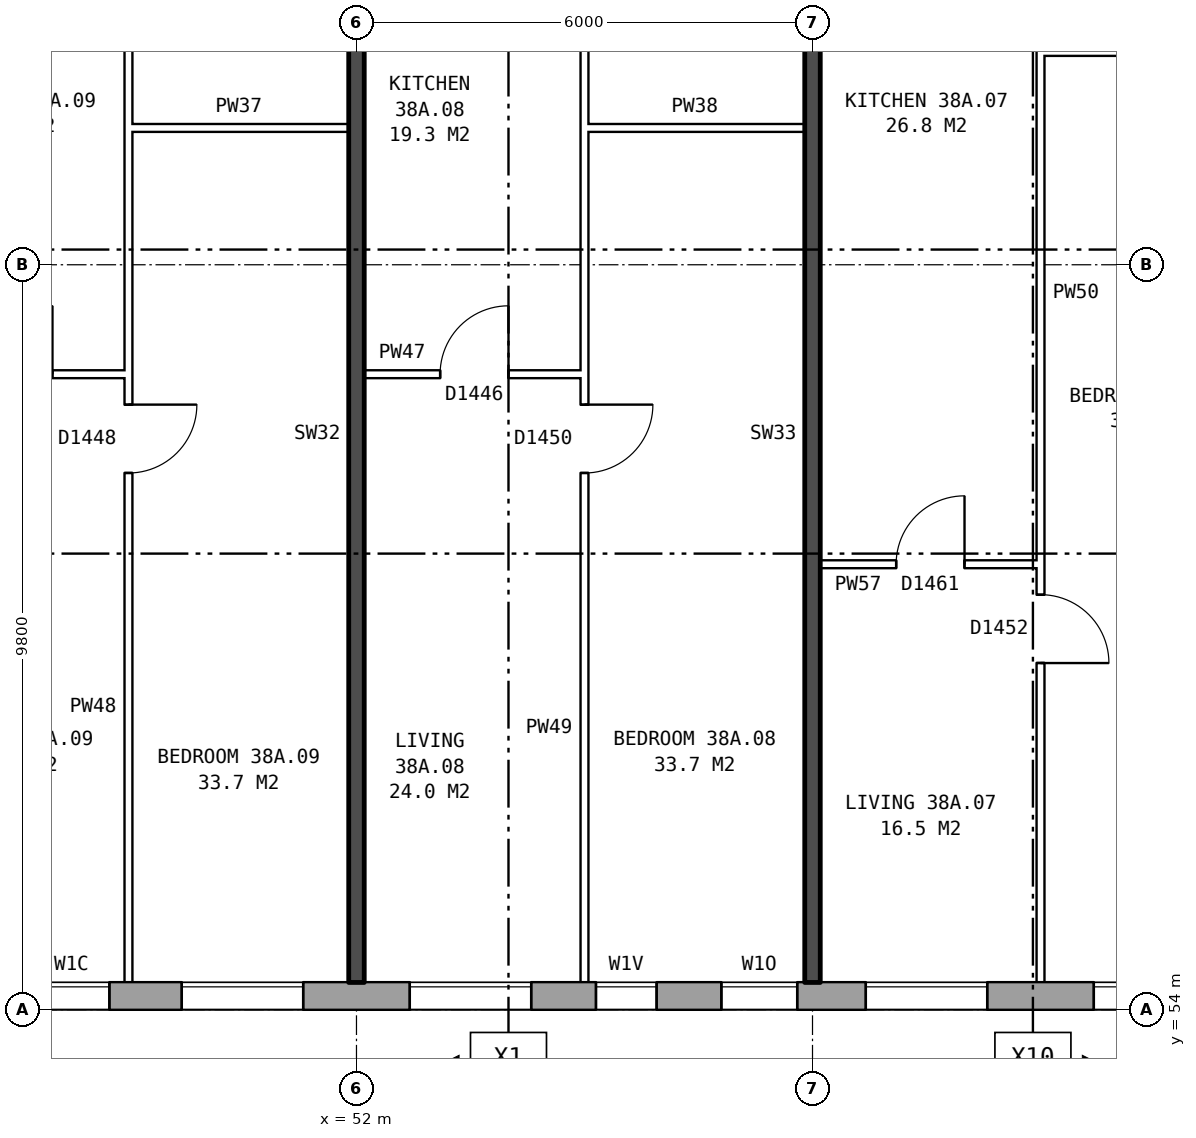
"""IFC4 building model, lengths in metres.
Left out: names, types, materials, properties, quantities, classifications, styles, units other than length and angle.
Written with IfcOpenShell. Run it as: python <this file> out.ifc"""

import sys

from ifc_helpers import new_model, si_unit, direction, frame, frame_2d, origin, place, context, subcontext, project, spatial, rectangle, extrude, element, fill, save


model = new_model("IFC4")
c1 = context("Model", 3, precision=1e-05, world=origin(), true_north=direction((0.0, 1.0)))
c2 = subcontext(c1, "Body", "Model", "MODEL_VIEW")
j1 = project(units=[si_unit("LENGTHUNIT", "METRE"), si_unit("PLANEANGLEUNIT", "RADIAN")], contexts=[c1])
p1 = place(None, origin())
s1 = spatial("IfcSite", under=j1, at=p1, CompositionType="ELEMENT")
p2 = place(p1, origin())
s2 = spatial("IfcBuilding", under=s1, at=p2, CompositionType="ELEMENT")
p3 = place(p2, frame((0.0, 0.0, 136.1)))
s3 = spatial("IfcBuildingStorey", under=s2, at=p3, CompositionType="ELEMENT", Elevation=136.1)
p4 = place(p3, frame((29.825, 54.18, 0.0), z_axis=(0.0, 0.0, 1.0), x_axis=(1.0, 0.0, 0.0)))
e1 = element("IfcWall", 1, at=p4, inside=s3, PredefinedType="STANDARD", context=c2, shape_type="SweptSolid", body=[
    extrude(rectangle(XDim=43.101, YDim=0.36, at=frame_2d((21.55, 0.0))), origin(), (0.0, 0.0, 1.0), 2.85),
])
p5 = place(p4, frame((1.875, 0.0, 0.8)))
e2 = element("IfcOpeningElement", 2, at=p5, cuts=e1, PredefinedType="OPENING", context=c2, shape_type="SweptSolid", body=[
    extrude(rectangle(XDim=1.6, YDim=1.8, at=frame_2d((0.8, 0.9))), frame((0.0, 0.19, 0.0), z_axis=(0.0, -1.0, 0.0), x_axis=(1.0, 0.0, 0.0)), (0.0, 0.0, 1.0), 0.38),
])
p6 = place(p4, frame((4.875, 0.0, 0.8)))
e3 = element("IfcOpeningElement", 3, at=p6, cuts=e1, PredefinedType="OPENING", context=c2, shape_type="SweptSolid", body=[
    extrude(rectangle(XDim=1.6, YDim=1.8, at=frame_2d((0.8, 0.9))), frame((0.0, 0.19, 0.0), z_axis=(0.0, -1.0, 0.0), x_axis=(1.0, 0.0, 0.0)), (0.0, 0.0, 1.0), 0.38),
])
p7 = place(p4, frame((7.875, 0.0, 0.8)))
e4 = element("IfcOpeningElement", 4, at=p7, cuts=e1, PredefinedType="OPENING", context=c2, shape_type="SweptSolid", body=[
    extrude(rectangle(XDim=1.6, YDim=1.8, at=frame_2d((0.8, 0.9))), frame((0.0, 0.19, 0.0), z_axis=(0.0, -1.0, 0.0), x_axis=(1.0, 0.0, 0.0)), (0.0, 0.0, 1.0), 0.38),
])
p8 = place(p4, frame((10.875, 0.0, 0.8)))
e5 = element("IfcOpeningElement", 5, at=p8, cuts=e1, PredefinedType="OPENING", context=c2, shape_type="SweptSolid", body=[
    extrude(rectangle(XDim=1.6, YDim=1.8, at=frame_2d((0.8, 0.9))), frame((0.0, 0.19, 0.0), z_axis=(0.0, -1.0, 0.0), x_axis=(1.0, 0.0, 0.0)), (0.0, 0.0, 1.0), 0.38),
])
p9 = place(p4, frame((13.875, 0.0, 0.8)))
e6 = element("IfcOpeningElement", 6, at=p9, cuts=e1, PredefinedType="OPENING", context=c2, shape_type="SweptSolid", body=[
    extrude(rectangle(XDim=1.6, YDim=1.8, at=frame_2d((0.8, 0.9))), frame((0.0, 0.19, 0.0), z_axis=(0.0, -1.0, 0.0), x_axis=(1.0, 0.0, 0.0)), (0.0, 0.0, 1.0), 0.38),
])
p10 = place(p4, frame((16.975, 0.0, 0.15)))
e7 = element("IfcOpeningElement", 7, at=p10, cuts=e1, PredefinedType="OPENING", context=c2, shape_type="SweptSolid", body=[
    extrude(rectangle(XDim=0.6, YDim=0.9, at=frame_2d((0.3, 0.45))), frame((0.0, 0.19, 0.0), z_axis=(0.0, -1.0, 0.0), x_axis=(1.0, 0.0, 0.0)), (0.0, 0.0, 1.0), 0.38),
])
p11 = place(p4, frame((19.875, 0.0, 0.8)))
e8 = element("IfcOpeningElement", 8, at=p11, cuts=e1, PredefinedType="OPENING", context=c2, shape_type="SweptSolid", body=[
    extrude(rectangle(XDim=1.6, YDim=1.8, at=frame_2d((0.8, 0.9))), frame((0.0, 0.19, 0.0), z_axis=(0.0, -1.0, 0.0), x_axis=(1.0, 0.0, 0.0)), (0.0, 0.0, 1.0), 0.38),
])
p12 = place(p4, frame((22.875, 0.0, 0.8)))
e9 = element("IfcOpeningElement", 9, at=p12, cuts=e1, PredefinedType="OPENING", context=c2, shape_type="SweptSolid", body=[
    extrude(rectangle(XDim=1.6, YDim=1.8, at=frame_2d((0.8, 0.9))), frame((0.0, 0.19, 0.0), z_axis=(0.0, -1.0, 0.0), x_axis=(1.0, 0.0, 0.0)), (0.0, 0.0, 1.0), 0.38),
])
p13 = place(p4, frame((25.325, 0.0, 0.15)))
e10 = element("IfcOpeningElement", 10, at=p13, cuts=e1, PredefinedType="OPENING", context=c2, shape_type="SweptSolid", body=[
    extrude(rectangle(XDim=0.8, YDim=0.9, at=frame_2d((0.4, 0.45))), frame((0.0, 0.19, 0.0), z_axis=(0.0, -1.0, 0.0), x_axis=(1.0, 0.0, 0.0)), (0.0, 0.0, 1.0), 0.38),
])
p14 = place(p4, frame((28.875, 0.0, 0.8)))
e11 = element("IfcOpeningElement", 11, at=p14, cuts=e1, PredefinedType="OPENING", context=c2, shape_type="SweptSolid", body=[
    extrude(rectangle(XDim=1.6, YDim=1.8, at=frame_2d((0.8, 0.9))), frame((0.0, 0.19, 0.0), z_axis=(0.0, -1.0, 0.0), x_axis=(1.0, 0.0, 0.0)), (0.0, 0.0, 1.0), 0.38),
])
p15 = place(p4, frame((31.875, 0.0, 0.8)))
e12 = element("IfcOpeningElement", 12, at=p15, cuts=e1, PredefinedType="OPENING", context=c2, shape_type="SweptSolid", body=[
    extrude(rectangle(XDim=1.6, YDim=1.8, at=frame_2d((0.8, 0.9))), frame((0.0, 0.19, 0.0), z_axis=(0.0, -1.0, 0.0), x_axis=(1.0, 0.0, 0.0)), (0.0, 0.0, 1.0), 0.38),
])
p16 = place(p4, frame((34.875, 0.0, 0.8)))
e13 = element("IfcOpeningElement", 13, at=p16, cuts=e1, PredefinedType="OPENING", context=c2, shape_type="SweptSolid", body=[
    extrude(rectangle(XDim=1.6, YDim=1.8, at=frame_2d((0.8, 0.9))), frame((0.0, 0.19, 0.0), z_axis=(0.0, -1.0, 0.0), x_axis=(1.0, 0.0, 0.0)), (0.0, 0.0, 1.0), 0.38),
])
p17 = place(p4, frame((37.875, 0.0, 0.8)))
e14 = element("IfcOpeningElement", 14, at=p17, cuts=e1, PredefinedType="OPENING", context=c2, shape_type="SweptSolid", body=[
    extrude(rectangle(XDim=1.6, YDim=1.8, at=frame_2d((0.8, 0.9))), frame((0.0, 0.19, 0.0), z_axis=(0.0, -1.0, 0.0), x_axis=(1.0, 0.0, 0.0)), (0.0, 0.0, 1.0), 0.38),
])
p18 = place(p4, frame((40.875, 0.0, 0.8)))
e15 = element("IfcOpeningElement", 15, at=p18, cuts=e1, PredefinedType="OPENING", context=c2, shape_type="SweptSolid", body=[
    extrude(rectangle(XDim=1.6, YDim=1.8, at=frame_2d((0.8, 0.9))), frame((0.0, 0.19, 0.0), z_axis=(0.0, -1.0, 0.0), x_axis=(1.0, 0.0, 0.0)), (0.0, 0.0, 1.0), 0.38),
])
p19 = place(p4, frame((17.925, 0.0, 0.15)))
e16 = element("IfcOpeningElement", 16, at=p19, cuts=e1, PredefinedType="OPENING", context=c2, shape_type="SweptSolid", body=[
    extrude(rectangle(XDim=1.0, YDim=1.8, at=frame_2d((0.5, 0.9))), frame((0.0, 0.19, 0.0), z_axis=(0.0, -1.0, 0.0), x_axis=(1.0, 0.0, 0.0)), (0.0, 0.0, 1.0), 0.38),
])
p20 = place(p4, frame((26.975, 0.0, 1.35)))
e17 = element("IfcOpeningElement", 17, at=p20, cuts=e1, PredefinedType="OPENING", context=c2, shape_type="SweptSolid", body=[
    extrude(rectangle(XDim=1.0, YDim=1.2, at=frame_2d((0.5, 0.6))), frame((0.0, 0.19, 0.0), z_axis=(0.0, -1.0, 0.0), x_axis=(1.0, 0.0, 0.0)), (0.0, 0.0, 1.0), 0.38),
])
p21 = place(p3, frame((58.1, 59.86, 0.0), z_axis=(0.0, 0.0, 1.0), x_axis=(1.0, 0.0, 0.0)))
e18 = element("IfcWall", 18, at=p21, inside=s3, PredefinedType="PARTITIONING", context=c2, shape_type="SweptSolid", body=[
    extrude(rectangle(XDim=2.9, YDim=0.1, at=frame_2d((1.45, 0.0))), origin(), (0.0, 0.0, 1.0), 2.85),
])
p22 = place(p21, frame((1.0, 0.0, 0.0)))
e19 = element("IfcOpeningElement", 19, at=p22, cuts=e18, PredefinedType="OPENING", context=c2, shape_type="SweptSolid", body=[
    extrude(rectangle(XDim=0.9, YDim=2.1, at=frame_2d((0.45, 1.05))), frame((0.0, 0.06, 0.0), z_axis=(0.0, -1.0, 0.0), x_axis=(1.0, 0.0, 0.0)), (0.0, 0.0, 1.0), 0.12),
])
p23 = place(p3, frame((46.1, 62.36, 0.0), z_axis=(0.0, 0.0, 1.0), x_axis=(1.0, 0.0, 0.0)))
e20 = element("IfcWall", 20, at=p23, inside=s3, PredefinedType="PARTITIONING", context=c2, shape_type="SweptSolid", body=[
    extrude(rectangle(XDim=2.9, YDim=0.1, at=frame_2d((1.45, 0.0))), origin(), (0.0, 0.0, 1.0), 2.85),
])
p24 = place(p23, frame((1.0, 0.0, 0.0)))
e21 = element("IfcOpeningElement", 21, at=p24, cuts=e20, PredefinedType="OPENING", context=c2, shape_type="SweptSolid", body=[
    extrude(rectangle(XDim=0.9, YDim=2.1, at=frame_2d((0.45, 1.05))), frame((0.0, 0.06, 0.0), z_axis=(0.0, -1.0, 0.0), x_axis=(1.0, 0.0, 0.0)), (0.0, 0.0, 1.0), 0.12),
])
p25 = place(p3, frame((52.1, 62.36, 0.0), z_axis=(0.0, 0.0, 1.0), x_axis=(1.0, 0.0, 0.0)))
e22 = element("IfcWall", 22, at=p25, inside=s3, PredefinedType="PARTITIONING", context=c2, shape_type="SweptSolid", body=[
    extrude(rectangle(XDim=2.9, YDim=0.1, at=frame_2d((1.45, 0.0))), origin(), (0.0, 0.0, 1.0), 2.85),
])
p26 = place(p25, frame((1.0, 0.0, 0.0)))
e23 = element("IfcOpeningElement", 23, at=p26, cuts=e22, PredefinedType="OPENING", context=c2, shape_type="SweptSolid", body=[
    extrude(rectangle(XDim=0.9, YDim=2.1, at=frame_2d((0.45, 1.05))), frame((0.0, 0.06, 0.0), z_axis=(0.0, -1.0, 0.0), x_axis=(1.0, 0.0, 0.0)), (0.0, 0.0, 1.0), 0.12),
])
for number, where, z_axis, x_axis in (
    (24, (49.0, 65.6, 0.0), (0.0, 0.0, 1.0), (1.0, 0.0, 0.0)),
    (25, (55.0, 65.6, 0.0), (0.0, 0.0, 1.0), (1.0, 0.0, 0.0)),
):
    element("IfcWall", number, at=place(p3, frame(where, z_axis=z_axis, x_axis=x_axis)), inside=s3, PredefinedType="PARTITIONING", context=c2, shape_type="SweptSolid", body=[
        extrude(rectangle(XDim=2.9, YDim=0.1, at=frame_2d((1.45, 0.0))), origin(), (0.0, 0.0, 1.0), 2.85),
    ])
p27 = place(p3, frame((61.0, 66.6, 0.0), z_axis=(0.0, 0.0, 1.0), x_axis=(1.0, 0.0, 0.0)))
e26 = element("IfcWall", 26, at=p27, inside=s3, PredefinedType="PARTITIONING", context=c2, shape_type="SweptSolid", body=[
    extrude(rectangle(XDim=2.64, YDim=0.1, at=frame_2d((1.32, 0.0))), origin(), (0.0, 0.0, 1.0), 2.85),
])
p28 = place(p3, frame((49.0, 54.36, 0.0), z_axis=(0.0, 0.0, 1.0), x_axis=(0.0, 1.0, 0.0)))
e27 = element("IfcWall", 27, at=p28, inside=s3, PredefinedType="PARTITIONING", context=c2, shape_type="SweptSolid", body=[
    extrude(rectangle(XDim=14.34, YDim=0.1, at=frame_2d((7.17, 0.0))), origin(), (0.0, 0.0, 1.0), 2.85),
])
p29 = place(p28, frame((6.7, 0.0, 0.0)))
e28 = element("IfcOpeningElement", 28, at=p29, cuts=e27, PredefinedType="OPENING", context=c2, shape_type="SweptSolid", body=[
    extrude(rectangle(XDim=0.9, YDim=2.1, at=frame_2d((0.45, 1.05))), frame((0.0, 0.06, 0.0), z_axis=(0.0, -1.0, 0.0), x_axis=(1.0, 0.0, 0.0)), (0.0, 0.0, 1.0), 0.12),
])
p30 = place(p28, frame((13.04, 0.0, 0.0)))
e29 = element("IfcOpeningElement", 29, at=p30, cuts=e27, PredefinedType="OPENING", context=c2, shape_type="SweptSolid", body=[
    extrude(rectangle(XDim=0.9, YDim=2.1, at=frame_2d((0.45, 1.05))), frame((0.0, 0.06, 0.0), z_axis=(0.0, -1.0, 0.0), x_axis=(1.0, 0.0, 0.0)), (0.0, 0.0, 1.0), 0.12),
])
p31 = place(p3, frame((52.0, 54.36, 0.0), z_axis=(0.0, 0.0, 1.0), x_axis=(0.0, 1.0, 0.0)))
e30 = element("IfcWall", 30, at=p31, inside=s3, PredefinedType="SOLIDWALL", context=c2, shape_type="SweptSolid", body=[
    extrude(rectangle(XDim=14.44, YDim=0.2, at=frame_2d((7.22, 0.0))), origin(), (0.0, 0.0, 1.0), 2.85),
])
p32 = place(p3, frame((55.0, 54.36, 0.0), z_axis=(0.0, 0.0, 1.0), x_axis=(0.0, 1.0, 0.0)))
e31 = element("IfcWall", 31, at=p32, inside=s3, PredefinedType="PARTITIONING", context=c2, shape_type="SweptSolid", body=[
    extrude(rectangle(XDim=14.34, YDim=0.1, at=frame_2d((7.17, 0.0))), origin(), (0.0, 0.0, 1.0), 2.85),
])
p33 = place(p32, frame((6.7, 0.0, 0.0)))
e32 = element("IfcOpeningElement", 32, at=p33, cuts=e31, PredefinedType="OPENING", context=c2, shape_type="SweptSolid", body=[
    extrude(rectangle(XDim=0.9, YDim=2.1, at=frame_2d((0.45, 1.05))), frame((0.0, 0.06, 0.0), z_axis=(0.0, -1.0, 0.0), x_axis=(1.0, 0.0, 0.0)), (0.0, 0.0, 1.0), 0.12),
])
p34 = place(p32, frame((13.04, 0.0, 0.0)))
e33 = element("IfcOpeningElement", 33, at=p34, cuts=e31, PredefinedType="OPENING", context=c2, shape_type="SweptSolid", body=[
    extrude(rectangle(XDim=0.9, YDim=2.1, at=frame_2d((0.45, 1.05))), frame((0.0, 0.06, 0.0), z_axis=(0.0, -1.0, 0.0), x_axis=(1.0, 0.0, 0.0)), (0.0, 0.0, 1.0), 0.12),
])
p35 = place(p3, frame((58.0, 54.36, 0.0), z_axis=(0.0, 0.0, 1.0), x_axis=(0.0, 1.0, 0.0)))
e34 = element("IfcWall", 34, at=p35, inside=s3, PredefinedType="SOLIDWALL", context=c2, shape_type="SweptSolid", body=[
    extrude(rectangle(XDim=14.44, YDim=0.2, at=frame_2d((7.22, 0.0))), origin(), (0.0, 0.0, 1.0), 2.85),
])
p36 = place(p3, frame((61.0, 54.36, 0.0), z_axis=(0.0, 0.0, 1.0), x_axis=(0.0, 1.0, 0.0)))
e35 = element("IfcWall", 35, at=p36, inside=s3, PredefinedType="PARTITIONING", context=c2, shape_type="SweptSolid", body=[
    extrude(rectangle(XDim=14.34, YDim=0.1, at=frame_2d((7.17, 0.0))), origin(), (0.0, 0.0, 1.0), 2.85),
])
p37 = place(p36, frame((4.2, 0.0, 0.0)))
e36 = element("IfcOpeningElement", 36, at=p37, cuts=e35, PredefinedType="OPENING", context=c2, shape_type="SweptSolid", body=[
    extrude(rectangle(XDim=0.9, YDim=2.1, at=frame_2d((0.45, 1.05))), frame((0.0, 0.06, 0.0), z_axis=(0.0, -1.0, 0.0), x_axis=(1.0, 0.0, 0.0)), (0.0, 0.0, 1.0), 0.12),
])
p38 = place(p36, frame((13.04, 0.0, 0.0)))
e37 = element("IfcOpeningElement", 37, at=p38, cuts=e35, PredefinedType="OPENING", context=c2, shape_type="SweptSolid", body=[
    extrude(rectangle(XDim=0.9, YDim=2.1, at=frame_2d((0.45, 1.05))), frame((0.0, 0.06, 0.0), z_axis=(0.0, -1.0, 0.0), x_axis=(1.0, 0.0, 0.0)), (0.0, 0.0, 1.0), 0.12),
])
p39 = place(p11, origin())
e38 = element("IfcWindow", 38, at=p39, inside=s3, PartitioningType="SINGLE_PANEL", PredefinedType="WINDOW", context=c2, shape_type="SweptSolid", body=[
    extrude(rectangle(XDim=1.6, YDim=1.8, at=frame_2d((0.8, 0.9))), frame((0.0, 0.15, 0.0), z_axis=(0.0, -1.0, 0.0), x_axis=(1.0, 0.0, 0.0)), (0.0, 0.0, 1.0), 0.06),
])
fill(e8, e38)
p40 = place(p12, origin())
e39 = element("IfcWindow", 39, at=p40, inside=s3, PartitioningType="SINGLE_PANEL", PredefinedType="WINDOW", context=c2, shape_type="SweptSolid", body=[
    extrude(rectangle(XDim=1.6, YDim=1.8, at=frame_2d((0.8, 0.9))), frame((0.0, 0.15, 0.0), z_axis=(0.0, -1.0, 0.0), x_axis=(1.0, 0.0, 0.0)), (0.0, 0.0, 1.0), 0.06),
])
fill(e9, e39)
p41 = place(p13, origin())
e40 = element("IfcWindow", 40, at=p41, inside=s3, PartitioningType="SINGLE_PANEL", PredefinedType="WINDOW", context=c2, shape_type="SweptSolid", body=[
    extrude(rectangle(XDim=0.8, YDim=0.9, at=frame_2d((0.4, 0.45))), frame((0.0, 0.15, 0.0), z_axis=(0.0, -1.0, 0.0), x_axis=(1.0, 0.0, 0.0)), (0.0, 0.0, 1.0), 0.06),
])
fill(e10, e40)
p42 = place(p14, origin())
e41 = element("IfcWindow", 41, at=p42, inside=s3, PartitioningType="SINGLE_PANEL", PredefinedType="WINDOW", context=c2, shape_type="SweptSolid", body=[
    extrude(rectangle(XDim=1.6, YDim=1.8, at=frame_2d((0.8, 0.9))), frame((0.0, 0.15, 0.0), z_axis=(0.0, -1.0, 0.0), x_axis=(1.0, 0.0, 0.0)), (0.0, 0.0, 1.0), 0.06),
])
fill(e11, e41)
p43 = place(p15, origin())
e42 = element("IfcWindow", 42, at=p43, inside=s3, PartitioningType="SINGLE_PANEL", PredefinedType="WINDOW", context=c2, shape_type="SweptSolid", body=[
    extrude(rectangle(XDim=1.6, YDim=1.8, at=frame_2d((0.8, 0.9))), frame((0.0, 0.15, 0.0), z_axis=(0.0, -1.0, 0.0), x_axis=(1.0, 0.0, 0.0)), (0.0, 0.0, 1.0), 0.06),
])
fill(e12, e42)
p44 = place(p37, frame((0.9, 0.0, 0.0), z_axis=(0.0, 0.0, 1.0), x_axis=(-1.0, 0.0, 0.0)))
e43 = element("IfcDoor", 43, at=p44, inside=s3, OperationType="SINGLE_SWING_RIGHT", PredefinedType="DOOR", context=c2, shape_type="SweptSolid", body=[
    extrude(rectangle(XDim=0.9, YDim=2.1, at=frame_2d((0.45, 1.05))), frame((0.0, 0.025, 0.0), z_axis=(0.0, -1.0, 0.0), x_axis=(1.0, 0.0, 0.0)), (0.0, 0.0, 1.0), 0.05),
])
fill(e36, e43)
p45 = place(p22, origin())
e44 = element("IfcDoor", 44, at=p45, inside=s3, OperationType="SINGLE_SWING_RIGHT", PredefinedType="DOOR", context=c2, shape_type="SweptSolid", body=[
    extrude(rectangle(XDim=0.9, YDim=2.1, at=frame_2d((0.45, 1.05))), frame((0.0, 0.025, 0.0), z_axis=(0.0, -1.0, 0.0), x_axis=(1.0, 0.0, 0.0)), (0.0, 0.0, 1.0), 0.05),
])
fill(e19, e44)
p46 = place(p33, frame((0.9, 0.0, 0.0), z_axis=(0.0, 0.0, 1.0), x_axis=(-1.0, 0.0, 0.0)))
e45 = element("IfcDoor", 45, at=p46, inside=s3, OperationType="SINGLE_SWING_LEFT", PredefinedType="DOOR", context=c2, shape_type="SweptSolid", body=[
    extrude(rectangle(XDim=0.9, YDim=2.1, at=frame_2d((0.45, 1.05))), frame((0.0, 0.025, 0.0), z_axis=(0.0, -1.0, 0.0), x_axis=(1.0, 0.0, 0.0)), (0.0, 0.0, 1.0), 0.05),
])
fill(e32, e45)
p47 = place(p26, origin())
e46 = element("IfcDoor", 46, at=p47, inside=s3, OperationType="SINGLE_SWING_RIGHT", PredefinedType="DOOR", context=c2, shape_type="SweptSolid", body=[
    extrude(rectangle(XDim=0.9, YDim=2.1, at=frame_2d((0.45, 1.05))), frame((0.0, 0.025, 0.0), z_axis=(0.0, -1.0, 0.0), x_axis=(1.0, 0.0, 0.0)), (0.0, 0.0, 1.0), 0.05),
])
fill(e23, e46)
p48 = place(p29, frame((0.9, 0.0, 0.0), z_axis=(0.0, 0.0, 1.0), x_axis=(-1.0, 0.0, 0.0)))
e47 = element("IfcDoor", 47, at=p48, inside=s3, OperationType="SINGLE_SWING_LEFT", PredefinedType="DOOR", context=c2, shape_type="SweptSolid", body=[
    extrude(rectangle(XDim=0.9, YDim=2.1, at=frame_2d((0.45, 1.05))), frame((0.0, 0.025, 0.0), z_axis=(0.0, -1.0, 0.0), x_axis=(1.0, 0.0, 0.0)), (0.0, 0.0, 1.0), 0.05),
])
fill(e28, e47)
p49 = place(p19, origin())
e48 = element("IfcWindow", 48, at=p49, inside=s3, PartitioningType="SINGLE_PANEL", PredefinedType="WINDOW", context=c2, shape_type="SweptSolid", body=[
    extrude(rectangle(XDim=1.0, YDim=1.8, at=frame_2d((0.5, 0.9))), frame((0.0, 0.15, 0.0), z_axis=(0.0, -1.0, 0.0), x_axis=(1.0, 0.0, 0.0)), (0.0, 0.0, 1.0), 0.06),
])
fill(e16, e48)
p50 = place(p20, origin())
e49 = element("IfcWindow", 49, at=p50, inside=s3, PartitioningType="SINGLE_PANEL", PredefinedType="WINDOW", context=c2, shape_type="SweptSolid", body=[
    extrude(rectangle(XDim=1.0, YDim=1.2, at=frame_2d((0.5, 0.6))), frame((0.0, 0.15, 0.0), z_axis=(0.0, -1.0, 0.0), x_axis=(1.0, 0.0, 0.0)), (0.0, 0.0, 1.0), 0.06),
])
fill(e17, e49)
save(model, sys.argv[1])
